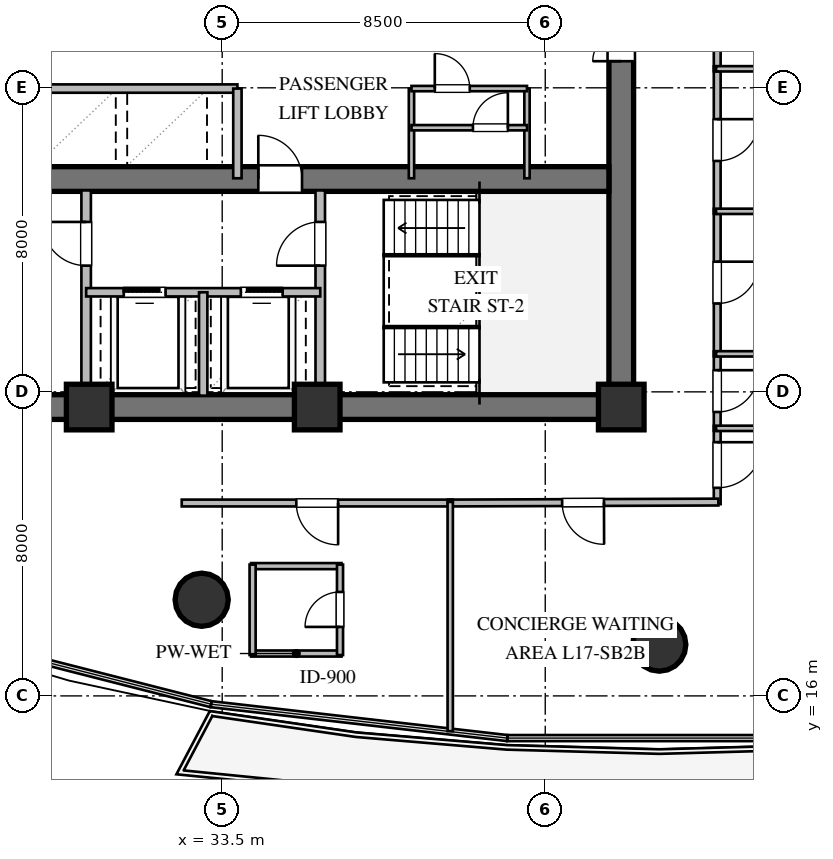
"""IFC4 building model, lengths in metres.
Left out: names, types, materials, properties, quantities, classifications, styles, units other than length and angle.
Written with IfcOpenShell. Run it as: python <this file> out.ifc"""

import sys

from ifc_helpers import new_model, si_unit, direction, frame, frame_2d, origin, origin_2d, place, context, subcontext, project, spatial, rectangle, circle, extrude, element, fill, save


model = new_model("IFC4")
c1 = context("Model", 3, precision=1e-05, world=origin(), true_north=direction((0.0, 1.0)))
c2 = subcontext(c1, "Body", "Model", "MODEL_VIEW")
j1 = project(units=[si_unit("LENGTHUNIT", "METRE"), si_unit("PLANEANGLEUNIT", "RADIAN")], contexts=[c1])
p1 = place(None, origin())
s1 = spatial("IfcSite", under=j1, at=p1, CompositionType="ELEMENT")
p2 = place(p1, origin())
s2 = spatial("IfcBuilding", under=s1, at=p2, CompositionType="ELEMENT")
p3 = place(p2, frame((0.0, 0.0, 67.2)))
s3 = spatial("IfcBuildingStorey", under=s2, at=p3, CompositionType="ELEMENT", Elevation=67.2)
p4 = place(p3, frame((21.675, 23.6, 0.0), z_axis=(0.0, 0.0, 1.0), x_axis=(1.0, 0.0, 0.0)))
e1 = element("IfcWall", 1, at=p4, inside=s3, PredefinedType="SHEAR", context=c2, shape_type="SweptSolid", body=[
    extrude(rectangle(XDim=22.65, YDim=0.65, at=frame_2d((11.325, 0.0))), origin(), (0.0, 0.0, 1.0), 3.36),
])
p5 = place(p3, frame((44.0, 23.925, 0.0), z_axis=(0.0, 0.0, 1.0), x_axis=(0.0, 1.0, 0.0)))
e2 = element("IfcWall", 2, at=p5, inside=s3, PredefinedType="SHEAR", context=c2, shape_type="SweptSolid", body=[
    extrude(rectangle(XDim=12.15, YDim=0.65, at=frame_2d((6.075, 0.0))), origin(), (0.0, 0.0, 1.0), 3.36),
])
p6 = place(p5, frame((8.775, 0.0, 0.0)))
e3 = element("IfcOpeningElement", 3, at=p6, cuts=e2, PredefinedType="OPENING", context=c2, shape_type="SweptSolid", body=[
    extrude(rectangle(XDim=1.5, YDim=2.15, at=frame_2d((0.75, 1.075))), frame((0.0, 0.335, 0.0), z_axis=(0.0, -1.0, 0.0), x_axis=(1.0, 0.0, 0.0)), (0.0, 0.0, 1.0), 0.67),
])
p7 = place(p3, frame((22.325, 29.6, 0.0), z_axis=(0.0, 0.0, 1.0), x_axis=(1.0, 0.0, 0.0)))
e4 = element("IfcWall", 4, at=p7, inside=s3, PredefinedType="SHEAR", context=c2, shape_type="SweptSolid", body=[
    extrude(rectangle(XDim=21.35, YDim=0.65, at=frame_2d((10.675, 0.0))), origin(), (0.0, 0.0, 1.0), 3.36),
])
p8 = place(p7, frame((12.125, 0.0, 0.0)))
e5 = element("IfcOpeningElement", 5, at=p8, cuts=e4, PredefinedType="OPENING", context=c2, shape_type="SweptSolid", body=[
    extrude(rectangle(XDim=1.15, YDim=2.1, at=frame_2d((0.575, 1.05))), frame((0.0, 0.335, 0.0), z_axis=(0.0, -1.0, 0.0), x_axis=(1.0, 0.0, 0.0)), (0.0, 0.0, 1.0), 0.67),
])
for number, where, z_axis, x_axis in (
    (6, (30.0, 23.6, 0.0), (0.0, 0.0, 1.0), (1.0, 0.0, 0.0)),
    (7, (36.0, 23.6, 0.0), (0.0, 0.0, 1.0), (1.0, 0.0, 0.0)),
    (8, (44.0, 23.6, 0.0), (0.0, 0.0, 1.0), (1.0, 0.0, 0.0)),
):
    element("IfcColumn", number, at=place(p3, frame(where, z_axis=z_axis, x_axis=x_axis)), inside=s3, PredefinedType="COLUMN", context=c2, shape_type="SweptSolid", body=[
        extrude(rectangle(XDim=1.2, YDim=1.2, at=origin_2d()), origin(), (0.0, 0.0, 1.0), 3.6),
    ])
for number, where, z_axis, x_axis in (
    (9, (32.96, 18.53, 0.0), (0.0, 0.0, 1.0), (1.0, 0.0, 0.0)),
    (10, (45.0, 17.35, 0.0), (0.0, 0.0, 1.0), (1.0, 0.0, 0.0)),
):
    element("IfcColumn", number, at=place(p3, frame(where, z_axis=z_axis, x_axis=x_axis)), inside=s3, PredefinedType="COLUMN", context=c2, shape_type="SweptSolid", body=[
        extrude(circle(Radius=0.7, at=origin_2d()), origin(), (0.0, 0.0, 1.0), 3.6),
    ])
p9 = place(p3, frame((29.92, 23.9, 0.0), z_axis=(0.0, 0.0, 1.0), x_axis=(0.0, 1.0, 0.0)))
e11 = element("IfcWall", 11, at=p9, inside=s3, PredefinedType="SOLIDWALL", context=c2, shape_type="SweptSolid", body=[
    extrude(rectangle(XDim=5.4, YDim=0.25, at=frame_2d((2.7, 0.0))), origin(), (0.0, 0.0, 1.0), 3.36),
])
p10 = place(p9, frame((3.421, 0.0, 0.0)))
e12 = element("IfcOpeningElement", 12, at=p10, cuts=e11, PredefinedType="OPENING", context=c2, shape_type="SweptSolid", body=[
    extrude(rectangle(XDim=1.15, YDim=2.1, at=frame_2d((0.575, 1.05))), frame((0.0, 0.135, 0.0), z_axis=(0.0, -1.0, 0.0), x_axis=(1.0, 0.0, 0.0)), (0.0, 0.0, 1.0), 0.27),
])
p11 = place(p3, frame((36.08, 23.9, 0.0), z_axis=(0.0, 0.0, 1.0), x_axis=(0.0, 1.0, 0.0)))
e13 = element("IfcWall", 13, at=p11, inside=s3, PredefinedType="SOLIDWALL", context=c2, shape_type="SweptSolid", body=[
    extrude(rectangle(XDim=5.4, YDim=0.25, at=frame_2d((2.7, 0.0))), origin(), (0.0, 0.0, 1.0), 3.36),
])
p12 = place(p11, frame((3.421, 0.0, 0.0)))
e14 = element("IfcOpeningElement", 14, at=p12, cuts=e13, PredefinedType="OPENING", context=c2, shape_type="SweptSolid", body=[
    extrude(rectangle(XDim=1.15, YDim=2.1, at=frame_2d((0.575, 1.05))), frame((0.0, 0.135, 0.0), z_axis=(0.0, -1.0, 0.0), x_axis=(1.0, 0.0, 0.0)), (0.0, 0.0, 1.0), 0.27),
])
p13 = place(p3, frame((29.92, 26.62, 0.0), z_axis=(0.0, 0.0, 1.0), x_axis=(1.0, 0.0, 0.0)))
e15 = element("IfcWall", 15, at=p13, inside=s3, PredefinedType="SOLIDWALL", context=c2, shape_type="SweptSolid", body=[
    extrude(rectangle(XDim=6.16, YDim=0.22, at=frame_2d((3.08, 0.0))), origin(), (0.0, 0.0, 1.0), 3.36),
])
p14 = place(p13, frame((0.99, 0.0, 0.0)))
e16 = element("IfcOpeningElement", 16, at=p14, cuts=e15, PredefinedType="OPENING", context=c2, shape_type="SweptSolid", body=[
    extrude(rectangle(XDim=1.1, YDim=2.1, at=frame_2d((0.55, 1.05))), frame((0.0, 0.12, 0.0), z_axis=(0.0, -1.0, 0.0), x_axis=(1.0, 0.0, 0.0)), (0.0, 0.0, 1.0), 0.24),
])
p15 = place(p13, frame((4.07, 0.0, 0.0)))
e17 = element("IfcOpeningElement", 17, at=p15, cuts=e15, PredefinedType="OPENING", context=c2, shape_type="SweptSolid", body=[
    extrude(rectangle(XDim=1.1, YDim=2.1, at=frame_2d((0.55, 1.05))), frame((0.0, 0.12, 0.0), z_axis=(0.0, -1.0, 0.0), x_axis=(1.0, 0.0, 0.0)), (0.0, 0.0, 1.0), 0.24),
])
p16 = place(p3, frame((33.0, 23.9, 0.0), z_axis=(0.0, 0.0, 1.0), x_axis=(0.0, 1.0, 0.0)))
e18 = element("IfcWall", 18, at=p16, inside=s3, PredefinedType="SOLIDWALL", context=c2, shape_type="SweptSolid", body=[
    extrude(rectangle(XDim=2.72, YDim=0.22, at=frame_2d((1.36, 0.0))), origin(), (0.0, 0.0, 1.0), 3.36),
])
p17 = place(p3, frame((26.1, 31.98, 0.0), z_axis=(0.0, 0.0, 1.0), x_axis=(1.0, 0.0, 0.0)))
e19 = element("IfcWall", 19, at=p17, inside=s3, PredefinedType="SOLIDWALL", context=c2, shape_type="SweptSolid", body=[
    extrude(rectangle(XDim=7.8, YDim=0.22, at=frame_2d((3.9, 0.0))), origin(), (0.0, 0.0, 1.0), 3.36),
])
p18 = place(p3, frame((33.9, 29.62, 0.0), z_axis=(0.0, 0.0, 1.0), x_axis=(0.0, 1.0, 0.0)))
e20 = element("IfcWall", 20, at=p18, inside=s3, PredefinedType="SOLIDWALL", context=c2, shape_type="SweptSolid", body=[
    extrude(rectangle(XDim=2.36, YDim=0.22, at=frame_2d((1.18, 0.0))), origin(), (0.0, 0.0, 1.0), 3.36),
])
for number, where, z_axis, x_axis in (
    (21, (38.48, 29.62, 0.0), (0.0, 0.0, 1.0), (0.0, 1.0, 0.0)),
    (22, (41.52, 29.62, 0.0), (0.0, 0.0, 1.0), (0.0, 1.0, 0.0)),
):
    element("IfcWall", number, at=place(p3, frame(where, z_axis=z_axis, x_axis=x_axis)), inside=s3, PredefinedType="PARTITIONING", context=c2, shape_type="SweptSolid", body=[
        extrude(rectangle(XDim=2.36, YDim=0.14, at=frame_2d((1.18, 0.0))), origin(), (0.0, 0.0, 1.0), 3.36),
    ])
p19 = place(p3, frame((38.48, 30.95, 0.0), z_axis=(0.0, 0.0, 1.0), x_axis=(1.0, 0.0, 0.0)))
e23 = element("IfcWall", 23, at=p19, inside=s3, PredefinedType="PARTITIONING", context=c2, shape_type="SweptSolid", body=[
    extrude(rectangle(XDim=3.04, YDim=0.14, at=frame_2d((1.52, 0.0))), origin(), (0.0, 0.0, 1.0), 3.36),
])
p20 = place(p19, frame((1.617, 0.0, 0.0)))
e24 = element("IfcOpeningElement", 24, at=p20, cuts=e23, PredefinedType="OPENING", context=c2, shape_type="SweptSolid", body=[
    extrude(rectangle(XDim=0.92, YDim=2.1, at=frame_2d((0.46, 1.05))), frame((0.0, 0.08, 0.0), z_axis=(0.0, -1.0, 0.0), x_axis=(1.0, 0.0, 0.0)), (0.0, 0.0, 1.0), 0.16),
])
p21 = place(p3, frame((38.48, 31.98, 0.0), z_axis=(0.0, 0.0, 1.0), x_axis=(1.0, 0.0, 0.0)))
e25 = element("IfcWall", 25, at=p21, inside=s3, PredefinedType="PARTITIONING", context=c2, shape_type="SweptSolid", body=[
    extrude(rectangle(XDim=3.04, YDim=0.14, at=frame_2d((1.52, 0.0))), origin(), (0.0, 0.0, 1.0), 3.36),
])
p22 = place(p21, frame((0.614, 0.0, 0.0)))
e26 = element("IfcOpeningElement", 26, at=p22, cuts=e25, PredefinedType="OPENING", context=c2, shape_type="SweptSolid", body=[
    extrude(rectangle(XDim=0.92, YDim=2.1, at=frame_2d((0.46, 1.05))), frame((0.0, 0.08, 0.0), z_axis=(0.0, -1.0, 0.0), x_axis=(1.0, 0.0, 0.0)), (0.0, 0.0, 1.0), 0.16),
])
for number, where, z_axis, x_axis in (
    (27, (34.26, 17.115, 0.0), (0.0, 0.0, 1.0), (1.0, 0.0, 0.0)),
    (28, (34.26, 19.415, 0.0), (0.0, 0.0, 1.0), (1.0, 0.0, 0.0)),
):
    element("IfcWall", number, at=place(p3, frame(where, z_axis=z_axis, x_axis=x_axis)), inside=s3, PredefinedType="PLUMBINGWALL", context=c2, shape_type="SweptSolid", body=[
        extrude(rectangle(XDim=2.38, YDim=0.16, at=frame_2d((1.19, 0.0))), origin(), (0.0, 0.0, 1.0), 3.36),
    ])
p23 = place(p3, frame((34.3, 17.075, 0.0), z_axis=(0.0, 0.0, 1.0), x_axis=(0.0, 1.0, 0.0)))
e29 = element("IfcWall", 29, at=p23, inside=s3, PredefinedType="PLUMBINGWALL", context=c2, shape_type="SweptSolid", body=[
    extrude(rectangle(XDim=2.38, YDim=0.16, at=frame_2d((1.19, 0.0))), origin(), (0.0, 0.0, 1.0), 3.36),
])
p24 = place(p3, frame((36.6, 17.075, 0.0), z_axis=(0.0, 0.0, 1.0), x_axis=(0.0, 1.0, 0.0)))
e30 = element("IfcWall", 30, at=p24, inside=s3, PredefinedType="PLUMBINGWALL", context=c2, shape_type="SweptSolid", body=[
    extrude(rectangle(XDim=2.38, YDim=0.16, at=frame_2d((1.19, 0.0))), origin(), (0.0, 0.0, 1.0), 3.36),
])
p25 = place(p24, frame((0.74, 0.0, 0.0)))
e31 = element("IfcOpeningElement", 31, at=p25, cuts=e30, PredefinedType="OPENING", context=c2, shape_type="SweptSolid", body=[
    extrude(rectangle(XDim=0.92, YDim=2.1, at=frame_2d((0.46, 1.05))), frame((0.0, 0.09, 0.0), z_axis=(0.0, -1.0, 0.0), x_axis=(1.0, 0.0, 0.0)), (0.0, 0.0, 1.0), 0.18),
])
p26 = place(p3, frame((46.525, 23.105, 0.0), z_axis=(0.0, 0.0, 1.0), x_axis=(0.0, -1.0, 0.0)))
e32 = element("IfcWall", 32, at=p26, inside=s3, PredefinedType="PARTITIONING", context=c2, shape_type="SweptSolid", body=[
    extrude(rectangle(XDim=2.06, YDim=0.18, at=frame_2d((1.03, 0.0))), origin(), (0.0, 0.0, 1.0), 3.36),
])
p27 = place(p26, frame((0.43, 0.0, 0.0)))
e33 = element("IfcOpeningElement", 33, at=p27, cuts=e32, PredefinedType="OPENING", context=c2, shape_type="SweptSolid", body=[
    extrude(rectangle(XDim=1.2, YDim=2.15, at=frame_2d((0.6, 1.075))), frame((0.0, 0.1, 0.0), z_axis=(0.0, -1.0, 0.0), x_axis=(1.0, 0.0, 0.0)), (0.0, 0.0, 1.0), 0.2),
])
p28 = place(p3, frame((46.525, 25.065, 0.0), z_axis=(0.0, 0.0, 1.0), x_axis=(0.0, -1.0, 0.0)))
e34 = element("IfcWall", 34, at=p28, inside=s3, PredefinedType="PARTITIONING", context=c2, shape_type="SweptSolid", body=[
    extrude(rectangle(XDim=2.09, YDim=0.18, at=frame_2d((1.045, 0.0))), origin(), (0.0, 0.0, 1.0), 3.36),
])
p29 = place(p28, frame((0.495, 0.0, 0.0)))
e35 = element("IfcOpeningElement", 35, at=p29, cuts=e34, PredefinedType="OPENING", context=c2, shape_type="SweptSolid", body=[
    extrude(rectangle(XDim=1.1, YDim=2.1, at=frame_2d((0.55, 1.05))), frame((0.0, 0.1, 0.0), z_axis=(0.0, -1.0, 0.0), x_axis=(1.0, 0.0, 0.0)), (0.0, 0.0, 1.0), 0.2),
])
p30 = place(p3, frame((46.525, 28.815, 0.0), z_axis=(0.0, 0.0, 1.0), x_axis=(0.0, -1.0, 0.0)))
e36 = element("IfcWall", 36, at=p30, inside=s3, PredefinedType="PARTITIONING", context=c2, shape_type="SweptSolid", body=[
    extrude(rectangle(XDim=3.88, YDim=0.18, at=frame_2d((1.94, 0.0))), origin(), (0.0, 0.0, 1.0), 3.36),
])
p31 = place(p30, frame((1.39, 0.0, 0.0)))
e37 = element("IfcOpeningElement", 37, at=p31, cuts=e36, PredefinedType="OPENING", context=c2, shape_type="SweptSolid", body=[
    extrude(rectangle(XDim=1.1, YDim=2.1, at=frame_2d((0.55, 1.05))), frame((0.0, 0.1, 0.0), z_axis=(0.0, -1.0, 0.0), x_axis=(1.0, 0.0, 0.0)), (0.0, 0.0, 1.0), 0.2),
])
p32 = place(p3, frame((46.525, 32.565, 0.0), z_axis=(0.0, 0.0, 1.0), x_axis=(0.0, -1.0, 0.0)))
e38 = element("IfcWall", 38, at=p32, inside=s3, PredefinedType="PARTITIONING", context=c2, shape_type="SweptSolid", body=[
    extrude(rectangle(XDim=3.88, YDim=0.18, at=frame_2d((1.94, 0.0))), origin(), (0.0, 0.0, 1.0), 3.36),
])
p33 = place(p32, frame((1.39, 0.0, 0.0)))
e39 = element("IfcOpeningElement", 39, at=p33, cuts=e38, PredefinedType="OPENING", context=c2, shape_type="SweptSolid", body=[
    extrude(rectangle(XDim=1.1, YDim=2.1, at=frame_2d((0.55, 1.05))), frame((0.0, 0.1, 0.0), z_axis=(0.0, -1.0, 0.0), x_axis=(1.0, 0.0, 0.0)), (0.0, 0.0, 1.0), 0.2),
])
p34 = place(p3, frame((46.525, 35.775, 0.0), z_axis=(0.0, 0.0, 1.0), x_axis=(0.0, -1.0, 0.0)))
e40 = element("IfcWall", 40, at=p34, inside=s3, PredefinedType="PARTITIONING", context=c2, shape_type="SweptSolid", body=[
    extrude(rectangle(XDim=3.34, YDim=0.18, at=frame_2d((1.67, 0.0))), origin(), (0.0, 0.0, 1.0), 3.36),
])
p35 = place(p34, frame((1.12, 0.0, 0.0)))
e41 = element("IfcOpeningElement", 41, at=p35, cuts=e40, PredefinedType="OPENING", context=c2, shape_type="SweptSolid", body=[
    extrude(rectangle(XDim=1.1, YDim=2.1, at=frame_2d((0.55, 1.05))), frame((0.0, 0.1, 0.0), z_axis=(0.0, -1.0, 0.0), x_axis=(1.0, 0.0, 0.0)), (0.0, 0.0, 1.0), 0.2),
])
p36 = place(p3, frame((39.565, 21.075, 0.0), z_axis=(0.0, 0.0, 1.0), x_axis=(-1.0, 0.0, 0.0)))
e42 = element("IfcWall", 42, at=p36, inside=s3, PredefinedType="PARTITIONING", context=c2, shape_type="SweptSolid", body=[
    extrude(rectangle(XDim=7.13, YDim=0.18, at=frame_2d((3.565, 0.0))), origin(), (0.0, 0.0, 1.0), 2.996),
])
p37 = place(p36, frame((3.015, 0.0, 0.0)))
e43 = element("IfcOpeningElement", 43, at=p37, cuts=e42, PredefinedType="OPENING", context=c2, shape_type="SweptSolid", body=[
    extrude(rectangle(XDim=1.1, YDim=2.1, at=frame_2d((0.55, 1.05))), frame((0.0, 0.1, 0.0), z_axis=(0.0, -1.0, 0.0), x_axis=(1.0, 0.0, 0.0)), (0.0, 0.0, 1.0), 0.2),
])
p38 = place(p3, frame((46.555, 21.1, 0.0), z_axis=(0.0, 0.0, 1.0), x_axis=(-0.999993762996, -0.00353185055, 0.0)))
e44 = element("IfcWall", 44, at=p38, inside=s3, PredefinedType="PARTITIONING", context=c2, shape_type="SweptSolid", body=[
    extrude(rectangle(XDim=7.12, YDim=0.18, at=frame_2d((3.56, 0.0))), origin(), (0.0, 0.0, 1.0), 3.36),
])
p39 = place(p38, frame((3.01, 0.0, 0.0)))
e45 = element("IfcOpeningElement", 45, at=p39, cuts=e44, PredefinedType="OPENING", context=c2, shape_type="SweptSolid", body=[
    extrude(rectangle(XDim=1.1, YDim=2.1, at=frame_2d((0.55, 1.05))), frame((0.0, 0.1, 0.0), z_axis=(0.0, -1.0, 0.0), x_axis=(1.0, 0.0, 0.0)), (0.0, 0.0, 1.0), 0.2),
])
p40 = place(p3, frame((46.495, 23.04, 0.0), z_axis=(0.0, 0.0, 1.0), x_axis=(1.0, 0.0, 0.0)))
e46 = element("IfcWall", 46, at=p40, inside=s3, PredefinedType="PARTITIONING", context=c2, shape_type="SweptSolid", body=[
    extrude(rectangle(XDim=27.6, YDim=0.14, at=frame_2d((13.8, 0.0))), origin(), (0.0, 0.0, 1.0), 2.89),
])
p41 = place(p3, frame((46.495, 25.0, 0.0), z_axis=(0.0, 0.0, 1.0), x_axis=(1.0, 0.0, 0.0)))
e47 = element("IfcWall", 47, at=p41, inside=s3, PredefinedType="PARTITIONING", context=c2, shape_type="SweptSolid", body=[
    extrude(rectangle(XDim=29.592, YDim=0.14, at=frame_2d((14.796, 0.0))), origin(), (0.0, 0.0, 1.0), 2.89),
])
p42 = place(p3, frame((46.495, 28.75, 0.0), z_axis=(0.0, 0.0, 1.0), x_axis=(1.0, 0.0, 0.0)))
e48 = element("IfcWall", 48, at=p42, inside=s3, PredefinedType="PARTITIONING", context=c2, shape_type="SweptSolid", body=[
    extrude(rectangle(XDim=32.212, YDim=0.14, at=frame_2d((16.106, 0.0))), origin(), (0.0, 0.0, 1.0), 2.89),
])
p43 = place(p3, frame((46.495, 32.5, 0.0), z_axis=(0.0, 0.0, 1.0), x_axis=(1.0, 0.0, 0.0)))
e49 = element("IfcWall", 49, at=p43, inside=s3, PredefinedType="PARTITIONING", context=c2, shape_type="SweptSolid", body=[
    extrude(rectangle(XDim=33.723, YDim=0.14, at=frame_2d((16.861, 0.0))), origin(), (0.0, 0.0, 1.0), 3.36),
])
p44 = place(p3, frame((39.5, 21.105, 0.0), z_axis=(0.0, 0.0, 1.0), x_axis=(0.0, -1.0, 0.0)))
e50 = element("IfcWall", 50, at=p44, inside=s3, PredefinedType="PARTITIONING", context=c2, shape_type="SweptSolid", body=[
    extrude(rectangle(XDim=6.033, YDim=0.14, at=frame_2d((3.017, 0.0))), origin(), (0.0, 0.0, 1.0), 3.36),
])
p45 = place(p10, origin())
e51 = element("IfcDoor", 51, at=p45, inside=s3, OperationType="SINGLE_SWING_RIGHT", PredefinedType="DOOR", context=c2, shape_type="SweptSolid", body=[
    extrude(rectangle(XDim=1.15, YDim=2.1, at=frame_2d((0.575, 1.05))), frame((0.0, 0.025, 0.0), z_axis=(0.0, -1.0, 0.0), x_axis=(1.0, 0.0, 0.0)), (0.0, 0.0, 1.0), 0.05),
])
fill(e12, e51)
p46 = place(p12, origin())
e52 = element("IfcDoor", 52, at=p46, inside=s3, OperationType="SINGLE_SWING_LEFT", PredefinedType="DOOR", context=c2, shape_type="SweptSolid", body=[
    extrude(rectangle(XDim=1.15, YDim=2.1, at=frame_2d((0.575, 1.05))), frame((0.0, 0.025, 0.0), z_axis=(0.0, -1.0, 0.0), x_axis=(1.0, 0.0, 0.0)), (0.0, 0.0, 1.0), 0.05),
])
fill(e14, e52)
p47 = place(p14, origin())
e53 = element("IfcDoor", 53, at=p47, inside=s3, OperationType="SLIDING_TO_LEFT", PredefinedType="DOOR", context=c2, shape_type="SweptSolid", body=[
    extrude(rectangle(XDim=1.1, YDim=2.1, at=frame_2d((0.55, 1.05))), frame((0.0, 0.025, 0.0), z_axis=(0.0, -1.0, 0.0), x_axis=(1.0, 0.0, 0.0)), (0.0, 0.0, 1.0), 0.05),
])
fill(e16, e53)
p48 = place(p15, origin())
e54 = element("IfcDoor", 54, at=p48, inside=s3, OperationType="SLIDING_TO_RIGHT", PredefinedType="DOOR", context=c2, shape_type="SweptSolid", body=[
    extrude(rectangle(XDim=1.1, YDim=2.1, at=frame_2d((0.55, 1.05))), frame((0.0, 0.025, 0.0), z_axis=(0.0, -1.0, 0.0), x_axis=(1.0, 0.0, 0.0)), (0.0, 0.0, 1.0), 0.05),
])
fill(e17, e54)
p49 = place(p8, origin())
e55 = element("IfcDoor", 55, at=p49, inside=s3, OperationType="SINGLE_SWING_LEFT", PredefinedType="DOOR", context=c2, shape_type="SweptSolid", body=[
    extrude(rectangle(XDim=1.15, YDim=2.1, at=frame_2d((0.575, 1.05))), frame((0.0, 0.025, 0.0), z_axis=(0.0, -1.0, 0.0), x_axis=(1.0, 0.0, 0.0)), (0.0, 0.0, 1.0), 0.05),
])
fill(e5, e55)
p50 = place(p6, origin())
e56 = element("IfcDoor", 56, at=p50, inside=s3, OperationType="DOUBLE_DOOR_SINGLE_SWING", PredefinedType="DOOR", context=c2, shape_type="SweptSolid", body=[
    extrude(rectangle(XDim=1.5, YDim=2.15, at=frame_2d((0.75, 1.075))), frame((0.0, 0.025, 0.0), z_axis=(0.0, -1.0, 0.0), x_axis=(1.0, 0.0, 0.0)), (0.0, 0.0, 1.0), 0.05),
])
fill(e3, e56)
p51 = place(p22, origin())
e57 = element("IfcDoor", 57, at=p51, inside=s3, OperationType="SINGLE_SWING_LEFT", PredefinedType="DOOR", context=c2, shape_type="SweptSolid", body=[
    extrude(rectangle(XDim=0.92, YDim=2.1, at=frame_2d((0.46, 1.05))), frame((0.0, 0.025, 0.0), z_axis=(0.0, -1.0, 0.0), x_axis=(1.0, 0.0, 0.0)), (0.0, 0.0, 1.0), 0.05),
])
fill(e26, e57)
p52 = place(p20, origin())
e58 = element("IfcDoor", 58, at=p52, inside=s3, OperationType="SINGLE_SWING_RIGHT", PredefinedType="DOOR", context=c2, shape_type="SweptSolid", body=[
    extrude(rectangle(XDim=0.92, YDim=2.1, at=frame_2d((0.46, 1.05))), frame((0.0, 0.025, 0.0), z_axis=(0.0, -1.0, 0.0), x_axis=(1.0, 0.0, 0.0)), (0.0, 0.0, 1.0), 0.05),
])
fill(e24, e58)
p53 = place(p25, origin())
e59 = element("IfcDoor", 59, at=p53, inside=s3, OperationType="SINGLE_SWING_LEFT", PredefinedType="DOOR", context=c2, shape_type="SweptSolid", body=[
    extrude(rectangle(XDim=0.92, YDim=2.1, at=frame_2d((0.46, 1.05))), frame((0.0, 0.025, 0.0), z_axis=(0.0, -1.0, 0.0), x_axis=(1.0, 0.0, 0.0)), (0.0, 0.0, 1.0), 0.05),
])
fill(e31, e59)
p54 = place(p27, origin())
e60 = element("IfcDoor", 60, at=p54, inside=s3, OperationType="SINGLE_SWING_LEFT", PredefinedType="DOOR", context=c2, shape_type="SweptSolid", body=[
    extrude(rectangle(XDim=1.2, YDim=2.15, at=frame_2d((0.6, 1.075))), frame((0.0, 0.025, 0.0), z_axis=(0.0, -1.0, 0.0), x_axis=(1.0, 0.0, 0.0)), (0.0, 0.0, 1.0), 0.05),
])
fill(e33, e60)
p55 = place(p29, origin())
e61 = element("IfcDoor", 61, at=p55, inside=s3, OperationType="SINGLE_SWING_LEFT", PredefinedType="DOOR", context=c2, shape_type="SweptSolid", body=[
    extrude(rectangle(XDim=1.1, YDim=2.1, at=frame_2d((0.55, 1.05))), frame((0.0, 0.025, 0.0), z_axis=(0.0, -1.0, 0.0), x_axis=(1.0, 0.0, 0.0)), (0.0, 0.0, 1.0), 0.05),
])
fill(e35, e61)
p56 = place(p31, origin())
e62 = element("IfcDoor", 62, at=p56, inside=s3, OperationType="SINGLE_SWING_LEFT", PredefinedType="DOOR", context=c2, shape_type="SweptSolid", body=[
    extrude(rectangle(XDim=1.1, YDim=2.1, at=frame_2d((0.55, 1.05))), frame((0.0, 0.025, 0.0), z_axis=(0.0, -1.0, 0.0), x_axis=(1.0, 0.0, 0.0)), (0.0, 0.0, 1.0), 0.05),
])
fill(e37, e62)
p57 = place(p33, origin())
e63 = element("IfcDoor", 63, at=p57, inside=s3, OperationType="SINGLE_SWING_LEFT", PredefinedType="DOOR", context=c2, shape_type="SweptSolid", body=[
    extrude(rectangle(XDim=1.1, YDim=2.1, at=frame_2d((0.55, 1.05))), frame((0.0, 0.025, 0.0), z_axis=(0.0, -1.0, 0.0), x_axis=(1.0, 0.0, 0.0)), (0.0, 0.0, 1.0), 0.05),
])
fill(e39, e63)
p58 = place(p37, origin())
e64 = element("IfcDoor", 64, at=p58, inside=s3, OperationType="SINGLE_SWING_LEFT", PredefinedType="DOOR", context=c2, shape_type="SweptSolid", body=[
    extrude(rectangle(XDim=1.1, YDim=2.1, at=frame_2d((0.55, 1.05))), frame((0.0, 0.025, 0.0), z_axis=(0.0, -1.0, 0.0), x_axis=(1.0, 0.0, 0.0)), (0.0, 0.0, 1.0), 0.05),
])
fill(e43, e64)
p59 = place(p39, origin())
e65 = element("IfcDoor", 65, at=p59, inside=s3, OperationType="SINGLE_SWING_LEFT", PredefinedType="DOOR", context=c2, shape_type="SweptSolid", body=[
    extrude(rectangle(XDim=1.1, YDim=2.1, at=frame_2d((0.55, 1.05))), frame((0.0, 0.025, 0.0), z_axis=(0.0, -1.0, 0.0), x_axis=(1.0, 0.0, 0.0)), (0.0, 0.0, 1.0), 0.05),
])
fill(e45, e65)
save(model, sys.argv[1])
